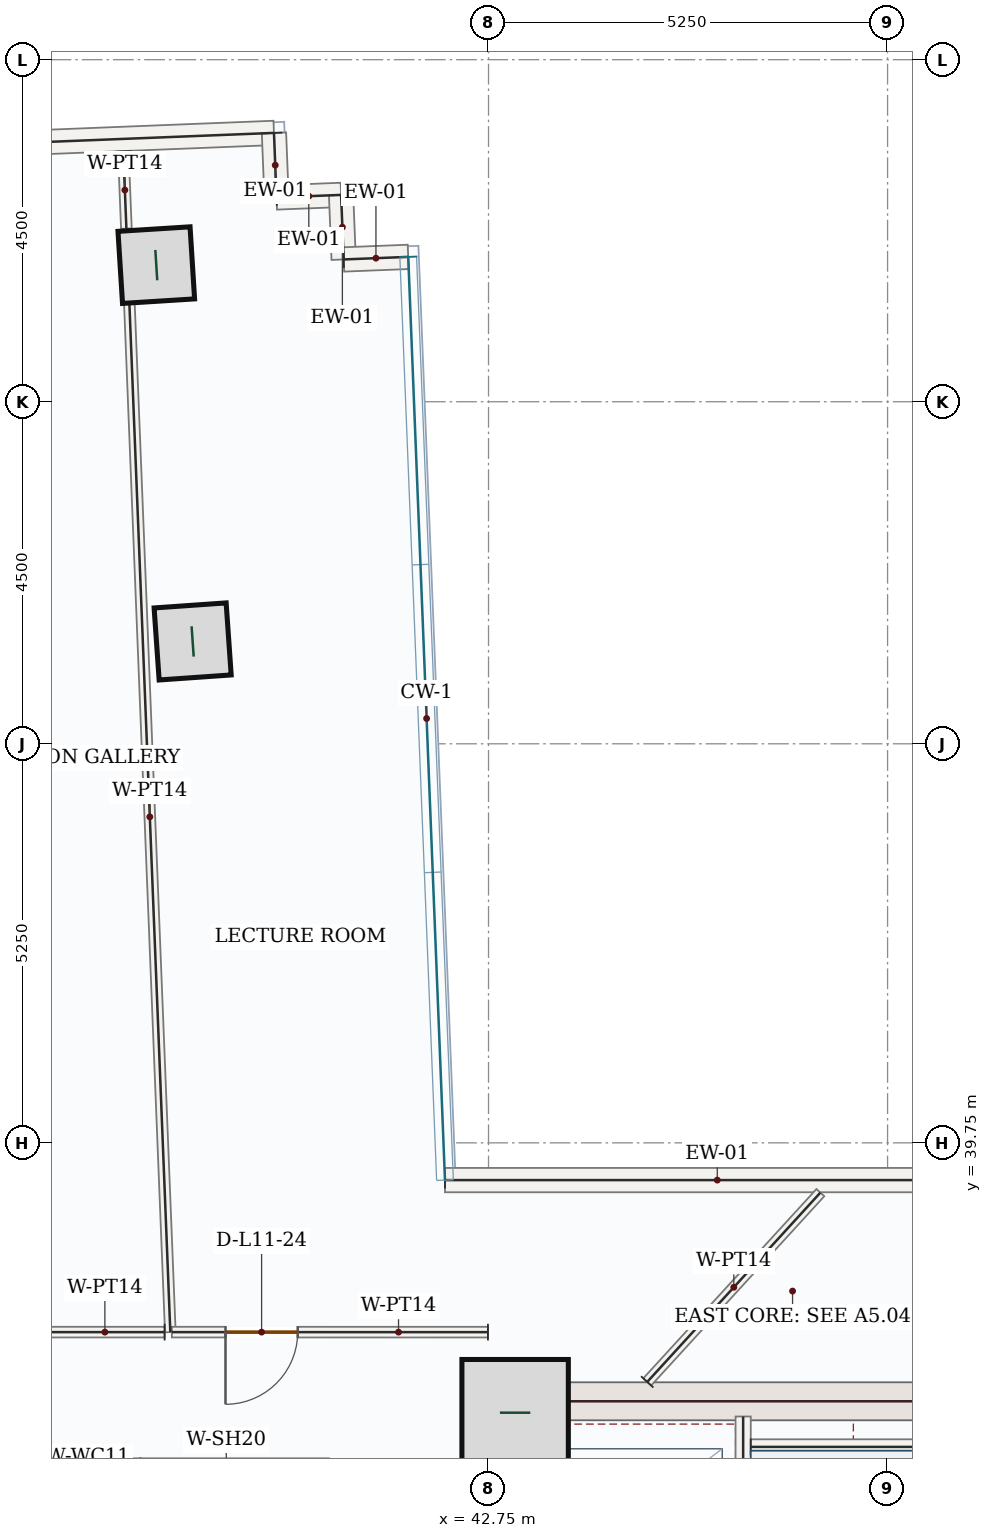
"""IFC4 building model, lengths in metres.
Left out: names, types, materials, properties, quantities, classifications, styles, units other than length and angle.
Written with IfcOpenShell. Run it as: python <this file> out.ifc"""

import sys

from ifc_helpers import new_model, si_unit, direction, frame, frame_2d, origin, origin_2d, place, context, subcontext, project, spatial, rectangle, hollow_rectangle, extrude, source, transform, mapped, element, fill, save


model = new_model("IFC4")
c1 = context("Model", 3, precision=1e-05, world=origin(), true_north=direction((0.0, 1.0)))
c2 = subcontext(c1, "Body", "Model", "MODEL_VIEW")
j1 = project(units=[si_unit("LENGTHUNIT", "METRE"), si_unit("PLANEANGLEUNIT", "RADIAN")], contexts=[c1])
p1 = place(None, origin())
s1 = spatial("IfcSite", under=j1, at=p1, CompositionType="ELEMENT")
p2 = place(p1, origin())
s2 = spatial("IfcBuilding", under=s1, at=p2, CompositionType="ELEMENT")
p3 = place(p2, frame((0.0, 0.0, 54.3)))
s3 = spatial("IfcBuildingStorey", under=s2, at=p3, CompositionType="ELEMENT", Elevation=54.3)
p4 = place(p3, frame((43.0, 28.05, 0.0), z_axis=(0.0, 0.0, 1.0), x_axis=(0.0, 1.0, 0.0)))
e1 = element("IfcWall", 1, at=p4, inside=s3, PredefinedType="SHEAR", context=c2, shape_type="SweptSolid", body=[
    extrude(rectangle(XDim=8.55, YDim=0.5, at=frame_2d((4.275, 0.0))), origin(), (0.0, 0.0, 1.0), 3.95),
])
p5 = place(p4, frame((1.5, 0.0, 0.0)))
e2 = element("IfcOpeningElement", 2, at=p5, cuts=e1, PredefinedType="OPENING", context=c2, shape_type="SweptSolid", body=[
    extrude(rectangle(XDim=1.1, YDim=2.2, at=frame_2d((0.55, 1.1))), frame((0.0, 0.26, 0.0), z_axis=(0.0, -1.0, 0.0), x_axis=(1.0, 0.0, 0.0)), (0.0, 0.0, 1.0), 0.52),
])
m1 = source(origin(), c2, "Body", "SweptSolid", [
    extrude(rectangle(XDim=7.0, YDim=0.5, at=frame_2d((3.5, 0.0))), origin(), (0.0, 0.0, 1.0), 3.95),
])
p6 = place(p3, frame((43.25, 36.35, 0.0), z_axis=(0.0, 0.0, 1.0), x_axis=(1.0, 0.0, 0.0)))
e3 = element("IfcWall", 3, at=p6, inside=s3, PredefinedType="SHEAR", context=c2, shape_type="MappedRepresentation", body=[
    mapped(m1, transform((0.0, 0.0, 0.0), x_axis=(1.0, 0.0, 0.0), y_axis=(0.0, 1.0, 0.0), z_axis=(0.0, 0.0, 1.0), scale=1.0)),
])
m2 = source(origin(), c2, "Body", "SweptSolid", [
    extrude(rectangle(XDim=1.4, YDim=1.4, at=origin_2d()), origin(), (0.0, 0.0, 1.0), 4.2),
])
p7 = place(p3, frame((43.1, 36.2, 0.0), z_axis=(0.0, 0.0, 1.0), x_axis=(1.0, 0.0, 0.0)))
e4 = element("IfcColumn", 4, at=p7, inside=s3, PredefinedType="COLUMN", context=c2, shape_type="MappedRepresentation", body=[
    mapped(m2, transform((0.0, 0.0, 0.0), x_axis=(1.0, 0.0, 0.0), y_axis=(0.0, 1.0, 0.0), z_axis=(0.0, 0.0, 1.0), scale=1.0)),
])
m3 = source(origin(), c2, "Body", "SweptSolid", [
    extrude(hollow_rectangle(XDim=0.95, YDim=0.95, WallThickness=0.05, at=origin_2d()), origin(), (0.0, 0.0, 1.0), 4.2),
])
for number, where, z_axis, x_axis in (
    (5, (38.857, 46.346, 0.0), (0.0, 0.0, 1.0), (-0.07, 0.998, 0.0)),
    (6, (38.379, 51.297, 0.0), (0.0, 0.0, 1.0), (-0.063, 0.998, 0.0)),
):
    element("IfcColumn", number, at=place(p3, frame(where, z_axis=z_axis, x_axis=x_axis)), inside=s3, PredefinedType="COLUMN", context=c2, shape_type="MappedRepresentation", body=[
        mapped(m3, transform((0.0, 0.0, 0.0), x_axis=(1.0, 0.0, 0.0), y_axis=(0.0, 1.0, 0.0), z_axis=(0.0, 0.0, 1.0), scale=1.0)),
    ])
m4 = source(origin(), c2, "Body", "SweptSolid", [
    extrude(rectangle(XDim=9.92, YDim=0.32, at=frame_2d((4.96, 0.0))), origin(), (0.0, 0.0, 1.0), 3.95),
])
p8 = place(p3, frame((30.015, 52.642, 0.0), z_axis=(0.0, 0.0, 1.0), x_axis=(0.999207823998, 0.039796035749, 0.0)))
e7 = element("IfcWall", 7, at=p8, inside=s3, PredefinedType="SOLIDWALL", context=c2, shape_type="MappedRepresentation", body=[
    mapped(m4, transform((0.0, 0.0, 0.0), x_axis=(1.0, 0.0, 0.0), y_axis=(0.0, 1.0, 0.0), z_axis=(0.0, 0.0, 1.0), scale=1.0)),
])
m5 = source(origin(), c2, "Body", "SweptSolid", [
    extrude(rectangle(XDim=0.85, YDim=0.32, at=frame_2d((0.425, 0.0))), origin(), (0.0, 0.0, 1.0), 3.95),
])
p9 = place(p3, frame((39.927, 53.037, 0.0), z_axis=(0.0, 0.0, 1.0), x_axis=(0.039922158152, -0.999202792875, 0.0)))
e8 = element("IfcWall", 8, at=p9, inside=s3, PredefinedType="SOLIDWALL", context=c2, shape_type="MappedRepresentation", body=[
    mapped(m5, transform((0.0, 0.0, 0.0), x_axis=(1.0, 0.0, 0.0), y_axis=(0.0, 1.0, 0.0), z_axis=(0.0, 0.0, 1.0), scale=1.0)),
])
m6 = source(origin(), c2, "Body", "SweptSolid", [
    extrude(rectangle(XDim=0.85, YDim=0.32, at=frame_2d((0.425, 0.0))), origin(), (0.0, 0.0, 1.0), 3.95),
])
for number, where, z_axis, x_axis in (
    (9, (39.961, 52.188, 0.0), (0.0, 0.0, 1.0), (0.999, 0.04, 0.0)),
    (10, (40.81, 52.221, 0.0), (0.0, 0.0, 1.0), (0.04, -0.999, 0.0)),
):
    element("IfcWall", number, at=place(p3, frame(where, z_axis=z_axis, x_axis=x_axis)), inside=s3, PredefinedType="SOLIDWALL", context=c2, shape_type="MappedRepresentation", body=[
        mapped(m6, transform((0.0, 0.0, 0.0), x_axis=(1.0, 0.0, 0.0), y_axis=(0.0, 1.0, 0.0), z_axis=(0.0, 0.0, 1.0), scale=1.0)),
    ])
p10 = place(p3, frame((40.844, 51.372, 0.0), z_axis=(0.0, 0.0, 1.0), x_axis=(0.999214208752, 0.039635401209, 0.0)))
e11 = element("IfcWall", 11, at=p10, inside=s3, PredefinedType="SOLIDWALL", context=c2, shape_type="MappedRepresentation", body=[
    mapped(m5, transform((0.0, 0.0, 0.0), x_axis=(1.0, 0.0, 0.0), y_axis=(0.0, 1.0, 0.0), z_axis=(0.0, 0.0, 1.0), scale=1.0)),
])
m7 = source(origin(), c2, "Body", "SweptSolid", [
    extrude(rectangle(XDim=7.165, YDim=0.32, at=frame_2d((3.583, 0.0))), origin(), (0.0, 0.0, 1.0), 3.95),
])
p11 = place(p3, frame((42.177, 39.26, 0.0), z_axis=(0.0, 0.0, 1.0), x_axis=(1.0, 0.0, 0.0)))
e12 = element("IfcWall", 12, at=p11, inside=s3, PredefinedType="SOLIDWALL", context=c2, shape_type="MappedRepresentation", body=[
    mapped(m7, transform((0.0, 0.0, 0.0), x_axis=(1.0, 0.0, 0.0), y_axis=(0.0, 1.0, 0.0), z_axis=(0.0, 0.0, 1.0), scale=1.0)),
])
p12 = place(p3, frame((46.1, 28.15, 0.0), z_axis=(0.0, 0.0, 1.0), x_axis=(0.0, 1.0, 0.0)))
e13 = element("IfcWall", 13, at=p12, inside=s3, PredefinedType="SOLIDWALL", context=c2, shape_type="SweptSolid", body=[
    extrude(rectangle(XDim=8.0, YDim=0.2, at=frame_2d((4.0, 0.0))), origin(), (0.0, 0.0, 1.0), 3.95),
])
p13 = place(p12, frame((0.4, 0.0, 0.0)))
e14 = element("IfcOpeningElement", 14, at=p13, cuts=e13, PredefinedType="OPENING", context=c2, shape_type="SweptSolid", body=[
    extrude(rectangle(XDim=1.05, YDim=2.15, at=frame_2d((0.525, 1.075))), frame((0.0, 0.11, 0.0), z_axis=(0.0, -1.0, 0.0), x_axis=(1.0, 0.0, 0.0)), (0.0, 0.0, 1.0), 0.22),
])
m8 = source(origin(), c2, "Body", "SweptSolid", [
    extrude(rectangle(XDim=3.25, YDim=0.2, at=frame_2d((1.625, 0.0))), origin(), (0.0, 0.0, 1.0), 3.95),
])
p14 = place(p3, frame((46.2, 35.75, 0.0), z_axis=(0.0, 0.0, 1.0), x_axis=(1.0, 0.0, 0.0)))
e15 = element("IfcWall", 15, at=p14, inside=s3, PredefinedType="SOLIDWALL", context=c2, shape_type="MappedRepresentation", body=[
    mapped(m8, transform((0.0, 0.0, 0.0), x_axis=(1.0, 0.0, 0.0), y_axis=(0.0, 1.0, 0.0), z_axis=(0.0, 0.0, 1.0), scale=1.0)),
])
m9 = source(origin(), c2, "Body", "SweptSolid", [
    extrude(rectangle(XDim=2.4, YDim=0.2, at=frame_2d((1.2, 0.0))), origin(), (0.0, 0.0, 1.0), 3.95),
])
for number, where, z_axis, x_axis in (
    (16, (38.05, 33.2, 0.0), (0.0, 0.0, 1.0), (0.0, 1.0, 0.0)),
    (17, (40.55, 33.2, 0.0), (0.0, 0.0, 1.0), (0.0, 1.0, 0.0)),
):
    element("IfcWall", number, at=place(p3, frame(where, z_axis=z_axis, x_axis=x_axis)), inside=s3, PredefinedType="SOLIDWALL", context=c2, shape_type="MappedRepresentation", body=[
        mapped(m9, transform((0.0, 0.0, 0.0), x_axis=(1.0, 0.0, 0.0), y_axis=(0.0, 1.0, 0.0), z_axis=(0.0, 0.0, 1.0), scale=1.0)),
    ])
m10 = source(origin(), c2, "Body", "SweptSolid", [
    extrude(rectangle(XDim=1.016, YDim=0.14, at=frame_2d((0.508, 0.0))), origin(), (0.0, 0.0, 1.0), 3.95),
])
p15 = place(p3, frame((37.945, 52.793, 0.0), z_axis=(0.0, 0.0, 1.0), x_axis=(0.03988168596, -0.99920440908, 0.0)))
e18 = element("IfcWall", 18, at=p15, inside=s3, PredefinedType="PARTITIONING", context=c2, shape_type="MappedRepresentation", body=[
    mapped(m10, transform((0.0, 0.0, 0.0), x_axis=(1.0, 0.0, 0.0), y_axis=(0.0, 1.0, 0.0), z_axis=(0.0, 0.0, 1.0), scale=1.0)),
])
m11 = source(origin(), c2, "Body", "SweptSolid", [
    extrude(rectangle(XDim=13.568, YDim=0.14, at=frame_2d((6.784, 0.0))), origin(), (0.0, 0.0, 1.0), 3.95),
])
p16 = place(p3, frame((38.024, 50.817, 0.0), z_axis=(0.0, 0.0, 1.0), x_axis=(0.039766111253, -0.99920901537, 0.0)))
e19 = element("IfcWall", 19, at=p16, inside=s3, PredefinedType="PARTITIONING", context=c2, shape_type="MappedRepresentation", body=[
    mapped(m11, transform((0.0, 0.0, 0.0), x_axis=(1.0, 0.0, 0.0), y_axis=(0.0, 1.0, 0.0), z_axis=(0.0, 0.0, 1.0), scale=1.0)),
])
p17 = place(p3, frame((38.489, 37.26, 0.0), z_axis=(0.0, 0.0, 1.0), x_axis=(-1.0, 0.0, 0.0)))
e20 = element("IfcWall", 20, at=p17, inside=s3, PredefinedType="PARTITIONING", context=c2, shape_type="SweptSolid", body=[
    extrude(rectangle(XDim=3.157, YDim=0.14, at=frame_2d((1.579, 0.0))), origin(), (0.0, 0.0, 1.0), 3.95),
])
p18 = place(p17, frame((1.722, 0.0, 0.0)))
e21 = element("IfcOpeningElement", 21, at=p18, cuts=e20, PredefinedType="OPENING", context=c2, shape_type="SweptSolid", body=[
    extrude(rectangle(XDim=0.95, YDim=2.15, at=frame_2d((0.475, 1.075))), frame((0.0, 0.08, 0.0), z_axis=(0.0, -1.0, 0.0), x_axis=(1.0, 0.0, 0.0)), (0.0, 0.0, 1.0), 0.16),
])
m12 = source(origin(), c2, "Body", "SweptSolid", [
    extrude(rectangle(XDim=3.375, YDim=0.14, at=frame_2d((1.688, 0.0))), origin(), (0.0, 0.0, 1.0), 3.95),
])
p19 = place(p3, frame((44.838, 36.605, 0.0), z_axis=(0.0, 0.0, 1.0), x_axis=(0.674974079893, 0.737841440604, 0.0)))
e22 = element("IfcWall", 22, at=p19, inside=s3, PredefinedType="PARTITIONING", context=c2, shape_type="MappedRepresentation", body=[
    mapped(m12, transform((0.0, 0.0, 0.0), x_axis=(1.0, 0.0, 0.0), y_axis=(0.0, 1.0, 0.0), z_axis=(0.0, 0.0, 1.0), scale=1.0)),
])
p20 = place(p3, frame((42.742, 37.26, 0.0), z_axis=(0.0, 0.0, 1.0), x_axis=(-0.999999998277, 5.8706117e-05, 0.0)))
e23 = element("IfcWall", 23, at=p20, inside=s3, PredefinedType="PARTITIONING", context=c2, shape_type="SweptSolid", body=[
    extrude(rectangle(XDim=4.159, YDim=0.14, at=frame_2d((2.079, 0.0))), origin(), (0.0, 0.0, 1.0), 3.95),
])
p21 = place(p20, frame((2.503, 0.0, 0.0)))
e24 = element("IfcOpeningElement", 24, at=p21, cuts=e23, PredefinedType="OPENING", context=c2, shape_type="SweptSolid", body=[
    extrude(rectangle(XDim=0.95, YDim=2.15, at=frame_2d((0.475, 1.075))), frame((0.0, 0.08, 0.0), z_axis=(0.0, -1.0, 0.0), x_axis=(1.0, 0.0, 0.0)), (0.0, 0.0, 1.0), 0.16),
])
m13 = source(origin(), c2, "Body", "SweptSolid", [
    extrude(rectangle(XDim=0.95, YDim=2.15, at=frame_2d((0.475, 1.075))), frame((0.0, 0.025, 0.0), z_axis=(0.0, -1.0, 0.0), x_axis=(1.0, 0.0, 0.0)), (0.0, 0.0, 1.0), 0.05),
])
p22 = place(p21, origin())
e25 = element("IfcDoor", 25, at=p22, inside=s3, OperationType="SINGLE_SWING_RIGHT", PredefinedType="DOOR", context=c2, shape_type="MappedRepresentation", body=[
    mapped(m13, transform((0.0, 0.0, 0.0), x_axis=(1.0, 0.0, 0.0), y_axis=(0.0, 1.0, 0.0), z_axis=(0.0, 0.0, 1.0), scale=1.0)),
])
fill(e24, e25)
save(model, sys.argv[1])
